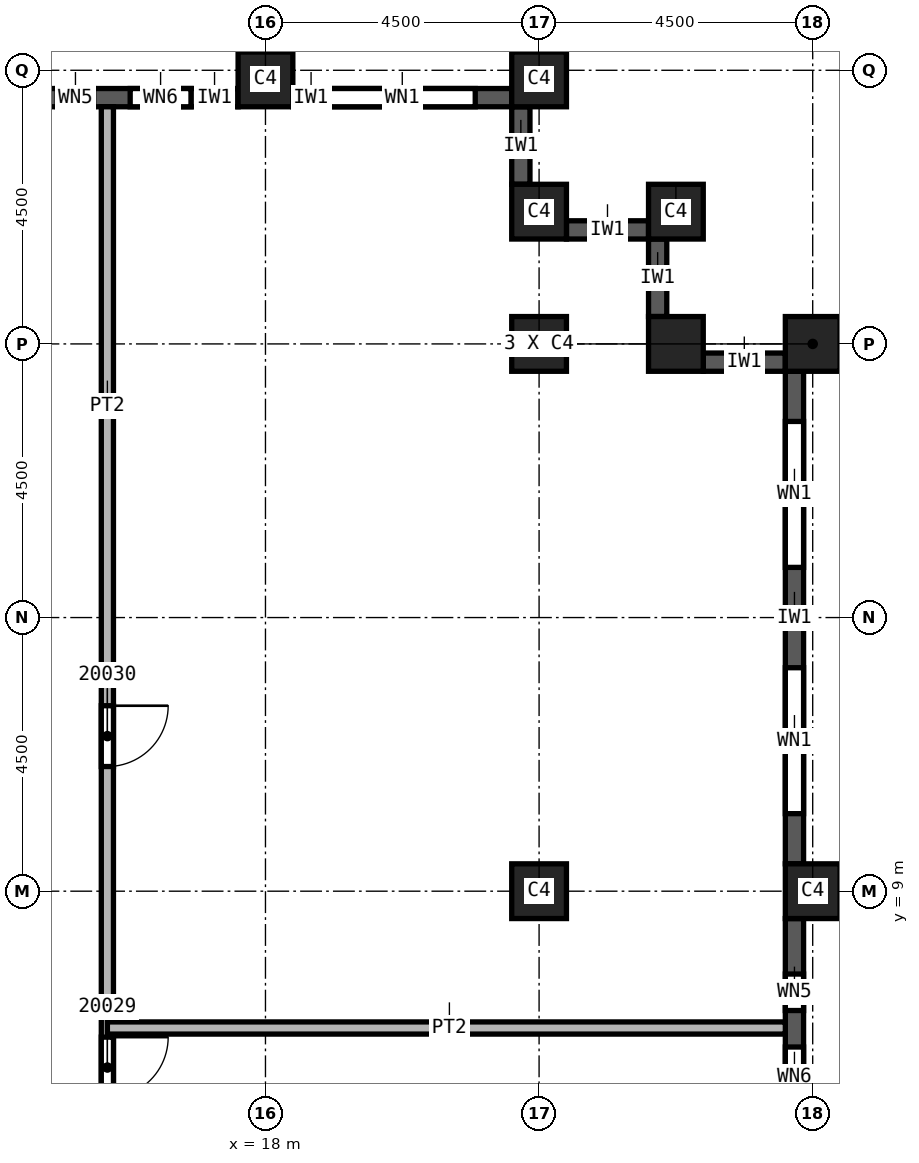
"""IFC4 building model, lengths in metres.
Left out: names, types, materials, properties, quantities, classifications, styles, units other than length and angle.
Written with IfcOpenShell. Run it as: python <this file> out.ifc"""

import sys

from ifc_helpers import new_model, si_unit, direction, frame, frame_2d, origin, origin_2d, place, context, subcontext, project, spatial, rectangle, extrude, element, fill, save


model = new_model("IFC4")
c1 = context("Model", 3, precision=1e-05, world=origin(), true_north=direction((0.0, 1.0)))
c2 = subcontext(c1, "Body", "Model", "MODEL_VIEW")
j1 = project(units=[si_unit("LENGTHUNIT", "METRE"), si_unit("PLANEANGLEUNIT", "RADIAN")], contexts=[c1])
p1 = place(None, origin())
s1 = spatial("IfcSite", under=j1, at=p1, CompositionType="ELEMENT")
p2 = place(p1, origin())
s2 = spatial("IfcBuilding", under=s1, at=p2, CompositionType="ELEMENT")
p3 = place(p2, frame((0.0, 0.0, 290.0)))
s3 = spatial("IfcBuildingStorey", under=s2, at=p3, CompositionType="ELEMENT", Elevation=290.0)
for number, where, z_axis, x_axis in (
    (1, (22.5, 9.0, 0.0), (0.0, 0.0, 1.0), (1.0, 0.0, 0.0)),
    (2, (22.5, 18.0, 0.0), (0.0, 0.0, 1.0), (1.0, 0.0, 0.0)),
    (3, (27.0, 9.0, 0.0), (0.0, 0.0, 1.0), (0.0, 1.0, 0.0)),
    (4, (27.0, 18.0, 0.0), (0.0, 0.0, 1.0), (0.0, 1.0, 0.0)),
    (5, (18.0, 22.35, 0.0), (0.0, 0.0, 1.0), (1.0, 0.0, 0.0)),
    (6, (22.5, 22.35, 0.0), (0.0, 0.0, 1.0), (1.0, 0.0, 0.0)),
    (7, (22.5, 20.175, 0.0), (0.0, 0.0, 1.0), (1.0, 0.0, 0.0)),
    (8, (24.75, 20.175, 0.0), (0.0, 0.0, 1.0), (1.0, 0.0, 0.0)),
    (9, (24.75, 18.0, 0.0), (0.0, 0.0, 1.0), (1.0, 0.0, 0.0)),
):
    element("IfcColumn", number, at=place(p3, frame(where, z_axis=z_axis, x_axis=x_axis)), inside=s3, PredefinedType="COLUMN", context=c2, shape_type="SweptSolid", body=[
        extrude(rectangle(XDim=0.9, YDim=0.9, at=origin_2d()), origin(), (0.0, 0.0, 1.0), 3.59),
    ])
p4 = place(p3, frame((26.7, 0.45, 0.0), z_axis=(0.0, 0.0, 1.0), x_axis=(0.0, 1.0, 0.0)))
e10 = element("IfcWall", 10, at=p4, inside=s3, PredefinedType="SOLIDWALL", context=c2, shape_type="SweptSolid", body=[
    extrude(rectangle(XDim=8.1, YDim=0.3, at=frame_2d((4.05, 0.0))), origin(), (0.0, 0.0, 1.0), 2.99),
])
p5 = place(p4, frame((0.875, 0.0, 0.8)))
e11 = element("IfcOpeningElement", 11, at=p5, cuts=e10, PredefinedType="OPENING", context=c2, shape_type="SweptSolid", body=[
    extrude(rectangle(XDim=1.8, YDim=1.95, at=frame_2d((0.9, 0.975))), frame((0.0, 0.15, 0.0), z_axis=(0.0, -1.0, 0.0), x_axis=(1.0, 0.0, 0.0)), (0.0, 0.0, 1.0), 0.3),
])
p6 = place(p4, frame((4.988, 0.0, 0.8)))
e12 = element("IfcOpeningElement", 12, at=p6, cuts=e10, PredefinedType="OPENING", context=c2, shape_type="SweptSolid", body=[
    extrude(rectangle(XDim=1.0, YDim=1.95, at=frame_2d((0.5, 0.975))), frame((0.0, 0.15, 0.0), z_axis=(0.0, -1.0, 0.0), x_axis=(1.0, 0.0, 0.0)), (0.0, 0.0, 1.0), 0.3),
])
p7 = place(p4, frame((6.587, 0.0, 0.8)))
e13 = element("IfcOpeningElement", 13, at=p7, cuts=e10, PredefinedType="OPENING", context=c2, shape_type="SweptSolid", body=[
    extrude(rectangle(XDim=0.6, YDim=1.95, at=frame_2d((0.3, 0.975))), frame((0.0, 0.15, 0.0), z_axis=(0.0, -1.0, 0.0), x_axis=(1.0, 0.0, 0.0)), (0.0, 0.0, 1.0), 0.3),
])
p8 = place(p3, frame((26.7, 9.45, 0.0), z_axis=(0.0, 0.0, 1.0), x_axis=(0.0, 1.0, 0.0)))
e14 = element("IfcWall", 14, at=p8, inside=s3, PredefinedType="SOLIDWALL", context=c2, shape_type="SweptSolid", body=[
    extrude(rectangle(XDim=8.1, YDim=0.3, at=frame_2d((4.05, 0.0))), origin(), (0.0, 0.0, 1.0), 2.99),
])
p9 = place(p8, frame((0.825, 0.0, 0.8)))
e15 = element("IfcOpeningElement", 15, at=p9, cuts=e14, PredefinedType="OPENING", context=c2, shape_type="SweptSolid", body=[
    extrude(rectangle(XDim=2.4, YDim=1.95, at=frame_2d((1.2, 0.975))), frame((0.0, 0.15, 0.0), z_axis=(0.0, -1.0, 0.0), x_axis=(1.0, 0.0, 0.0)), (0.0, 0.0, 1.0), 0.3),
])
p10 = place(p8, frame((4.875, 0.0, 0.8)))
e16 = element("IfcOpeningElement", 16, at=p10, cuts=e14, PredefinedType="OPENING", context=c2, shape_type="SweptSolid", body=[
    extrude(rectangle(XDim=2.4, YDim=1.95, at=frame_2d((1.2, 0.975))), frame((0.0, 0.15, 0.0), z_axis=(0.0, -1.0, 0.0), x_axis=(1.0, 0.0, 0.0)), (0.0, 0.0, 1.0), 0.3),
])
p11 = place(p3, frame((26.55, 17.7, 0.0), z_axis=(0.0, 0.0, 1.0), x_axis=(-1.0, 0.0, 0.0)))
e17 = element("IfcWall", 17, at=p11, inside=s3, PredefinedType="SOLIDWALL", context=c2, shape_type="SweptSolid", body=[
    extrude(rectangle(XDim=1.35, YDim=0.3, at=frame_2d((0.675, 0.0))), origin(), (0.0, 0.0, 1.0), 2.99),
])
p12 = place(p3, frame((24.45, 18.45, 0.0), z_axis=(0.0, 0.0, 1.0), x_axis=(0.0, 1.0, 0.0)))
e18 = element("IfcWall", 18, at=p12, inside=s3, PredefinedType="SOLIDWALL", context=c2, shape_type="SweptSolid", body=[
    extrude(rectangle(XDim=1.275, YDim=0.3, at=frame_2d((0.638, 0.0))), origin(), (0.0, 0.0, 1.0), 2.99),
])
p13 = place(p3, frame((24.3, 19.875, 0.0), z_axis=(0.0, 0.0, 1.0), x_axis=(-1.0, 0.0, 0.0)))
e19 = element("IfcWall", 19, at=p13, inside=s3, PredefinedType="SOLIDWALL", context=c2, shape_type="SweptSolid", body=[
    extrude(rectangle(XDim=1.35, YDim=0.3, at=frame_2d((0.675, 0.0))), origin(), (0.0, 0.0, 1.0), 2.99),
])
p14 = place(p3, frame((22.2, 20.625, 0.0), z_axis=(0.0, 0.0, 1.0), x_axis=(0.0, 1.0, 0.0)))
e20 = element("IfcWall", 20, at=p14, inside=s3, PredefinedType="SOLIDWALL", context=c2, shape_type="SweptSolid", body=[
    extrude(rectangle(XDim=1.275, YDim=0.3, at=frame_2d((0.637, 0.0))), origin(), (0.0, 0.0, 1.0), 2.99),
])
p15 = place(p3, frame((22.05, 22.05, 0.0), z_axis=(0.0, 0.0, 1.0), x_axis=(-1.0, 0.0, 0.0)))
e21 = element("IfcWall", 21, at=p15, inside=s3, PredefinedType="SOLIDWALL", context=c2, shape_type="SweptSolid", body=[
    extrude(rectangle(XDim=3.6, YDim=0.3, at=frame_2d((1.8, 0.0))), origin(), (0.0, 0.0, 1.0), 2.99),
])
p16 = place(p15, frame((0.6, 0.0, 0.8)))
e22 = element("IfcOpeningElement", 22, at=p16, cuts=e21, PredefinedType="OPENING", context=c2, shape_type="SweptSolid", body=[
    extrude(rectangle(XDim=2.4, YDim=1.95, at=frame_2d((1.2, 0.975))), frame((0.0, 0.15, 0.0), z_axis=(0.0, -1.0, 0.0), x_axis=(1.0, 0.0, 0.0)), (0.0, 0.0, 1.0), 0.3),
])
p17 = place(p3, frame((17.55, 22.05, 0.0), z_axis=(0.0, 0.0, 1.0), x_axis=(-1.0, 0.0, 0.0)))
e23 = element("IfcWall", 23, at=p17, inside=s3, PredefinedType="SOLIDWALL", context=c2, shape_type="SweptSolid", body=[
    extrude(rectangle(XDim=3.6, YDim=0.3, at=frame_2d((1.8, 0.0))), origin(), (0.0, 0.0, 1.0), 2.99),
])
p18 = place(p17, frame((0.775, 0.0, 0.8)))
e24 = element("IfcOpeningElement", 24, at=p18, cuts=e23, PredefinedType="OPENING", context=c2, shape_type="SweptSolid", body=[
    extrude(rectangle(XDim=1.0, YDim=1.95, at=frame_2d((0.5, 0.975))), frame((0.0, 0.15, 0.0), z_axis=(0.0, -1.0, 0.0), x_axis=(1.0, 0.0, 0.0)), (0.0, 0.0, 1.0), 0.3),
])
p19 = place(p17, frame((2.375, 0.0, 0.8)))
e25 = element("IfcOpeningElement", 25, at=p19, cuts=e23, PredefinedType="OPENING", context=c2, shape_type="SweptSolid", body=[
    extrude(rectangle(XDim=0.6, YDim=1.95, at=frame_2d((0.3, 0.975))), frame((0.0, 0.15, 0.0), z_axis=(0.0, -1.0, 0.0), x_axis=(1.0, 0.0, 0.0)), (0.0, 0.0, 1.0), 0.3),
])
p20 = place(p3, frame((15.4, 21.9, 0.0), z_axis=(0.0, 0.0, 1.0), x_axis=(0.0, -1.0, 0.0)))
e26 = element("IfcWall", 26, at=p20, inside=s3, PredefinedType="PARTITIONING", context=c2, shape_type="SweptSolid", body=[
    extrude(rectangle(XDim=43.8, YDim=0.2, at=frame_2d((21.9, 0.0))), origin(), (0.0, 0.0, 1.0), 3.59),
])
p21 = place(p20, frame((18.675, 0.0, 0.0)))
e27 = element("IfcOpeningElement", 27, at=p21, cuts=e26, PredefinedType="OPENING", context=c2, shape_type="SweptSolid", body=[
    extrude(rectangle(XDim=1.0, YDim=2.1, at=frame_2d((0.5, 1.05))), frame((0.0, 0.1, 0.0), z_axis=(0.0, -1.0, 0.0), x_axis=(1.0, 0.0, 0.0)), (0.0, 0.0, 1.0), 0.2),
])
p22 = place(p20, frame((15.3, 0.0, 0.0)))
e28 = element("IfcOpeningElement", 28, at=p22, cuts=e26, PredefinedType="OPENING", context=c2, shape_type="SweptSolid", body=[
    extrude(rectangle(XDim=1.0, YDim=2.1, at=frame_2d((0.5, 1.05))), frame((0.0, 0.1, 0.0), z_axis=(0.0, -1.0, 0.0), x_axis=(1.0, 0.0, 0.0)), (0.0, 0.0, 1.0), 0.2),
])
p23 = place(p20, frame((9.85, 0.0, 0.0)))
e29 = element("IfcOpeningElement", 29, at=p23, cuts=e26, PredefinedType="OPENING", context=c2, shape_type="SweptSolid", body=[
    extrude(rectangle(XDim=1.0, YDim=2.1, at=frame_2d((0.5, 1.05))), frame((0.0, 0.1, 0.0), z_axis=(0.0, -1.0, 0.0), x_axis=(1.0, 0.0, 0.0)), (0.0, 0.0, 1.0), 0.2),
])
p24 = place(p20, frame((42.0, 0.0, 0.0)))
e30 = element("IfcOpeningElement", 30, at=p24, cuts=e26, PredefinedType="OPENING", context=c2, shape_type="SweptSolid", body=[
    extrude(rectangle(XDim=1.0, YDim=2.1, at=frame_2d((0.5, 1.05))), frame((0.0, 0.1, 0.0), z_axis=(0.0, -1.0, 0.0), x_axis=(1.0, 0.0, 0.0)), (0.0, 0.0, 1.0), 0.2),
])
p25 = place(p20, frame((34.65, 0.0, 0.0)))
e31 = element("IfcOpeningElement", 31, at=p25, cuts=e26, PredefinedType="OPENING", context=c2, shape_type="SweptSolid", body=[
    extrude(rectangle(XDim=1.0, YDim=2.1, at=frame_2d((0.5, 1.05))), frame((0.0, 0.1, 0.0), z_axis=(0.0, -1.0, 0.0), x_axis=(1.0, 0.0, 0.0)), (0.0, 0.0, 1.0), 0.2),
])
p26 = place(p20, frame((25.95, 0.0, 0.0)))
e32 = element("IfcOpeningElement", 32, at=p26, cuts=e26, PredefinedType="OPENING", context=c2, shape_type="SweptSolid", body=[
    extrude(rectangle(XDim=1.0, YDim=2.1, at=frame_2d((0.5, 1.05))), frame((0.0, 0.1, 0.0), z_axis=(0.0, -1.0, 0.0), x_axis=(1.0, 0.0, 0.0)), (0.0, 0.0, 1.0), 0.2),
])
p27 = place(p3, frame((15.4, 6.75, 0.0), z_axis=(0.0, 0.0, 1.0), x_axis=(1.0, 0.0, 0.0)))
e33 = element("IfcWall", 33, at=p27, inside=s3, PredefinedType="PARTITIONING", context=c2, shape_type="SweptSolid", body=[
    extrude(rectangle(XDim=11.15, YDim=0.2, at=frame_2d((5.575, 0.0))), origin(), (0.0, 0.0, 1.0), 3.59),
])
p28 = place(p9, origin())
e34 = element("IfcWindow", 34, at=p28, inside=s3, PartitioningType="SINGLE_PANEL", PredefinedType="WINDOW", context=c2, shape_type="SweptSolid", body=[
    extrude(rectangle(XDim=2.4, YDim=1.95, at=frame_2d((1.2, 0.975))), frame((0.0, 0.03, 0.0), z_axis=(0.0, -1.0, 0.0), x_axis=(1.0, 0.0, 0.0)), (0.0, 0.0, 1.0), 0.06),
])
fill(e15, e34)
p29 = place(p10, origin())
e35 = element("IfcWindow", 35, at=p29, inside=s3, PartitioningType="SINGLE_PANEL", PredefinedType="WINDOW", context=c2, shape_type="SweptSolid", body=[
    extrude(rectangle(XDim=2.4, YDim=1.95, at=frame_2d((1.2, 0.975))), frame((0.0, 0.03, 0.0), z_axis=(0.0, -1.0, 0.0), x_axis=(1.0, 0.0, 0.0)), (0.0, 0.0, 1.0), 0.06),
])
fill(e16, e35)
p30 = place(p16, origin())
e36 = element("IfcWindow", 36, at=p30, inside=s3, PartitioningType="SINGLE_PANEL", PredefinedType="WINDOW", context=c2, shape_type="SweptSolid", body=[
    extrude(rectangle(XDim=2.4, YDim=1.95, at=frame_2d((1.2, 0.975))), frame((0.0, 0.03, 0.0), z_axis=(0.0, -1.0, 0.0), x_axis=(1.0, 0.0, 0.0)), (0.0, 0.0, 1.0), 0.06),
])
fill(e22, e36)
p31 = place(p22, origin())
e37 = element("IfcDoor", 37, at=p31, inside=s3, OperationType="SINGLE_SWING_RIGHT", PredefinedType="DOOR", context=c2, shape_type="SweptSolid", body=[
    extrude(rectangle(XDim=1.0, YDim=2.1, at=frame_2d((0.5, 1.05))), frame((0.0, 0.025, 0.0), z_axis=(0.0, -1.0, 0.0), x_axis=(1.0, 0.0, 0.0)), (0.0, 0.0, 1.0), 0.05),
])
fill(e28, e37)
p32 = place(p23, origin())
e38 = element("IfcDoor", 38, at=p32, inside=s3, OperationType="SINGLE_SWING_LEFT", PredefinedType="DOOR", context=c2, shape_type="SweptSolid", body=[
    extrude(rectangle(XDim=1.0, YDim=2.1, at=frame_2d((0.5, 1.05))), frame((0.0, 0.025, 0.0), z_axis=(0.0, -1.0, 0.0), x_axis=(1.0, 0.0, 0.0)), (0.0, 0.0, 1.0), 0.05),
])
fill(e29, e38)
p33 = place(p6, origin())
e39 = element("IfcWindow", 39, at=p33, inside=s3, PartitioningType="SINGLE_PANEL", PredefinedType="WINDOW", context=c2, shape_type="SweptSolid", body=[
    extrude(rectangle(XDim=1.0, YDim=1.95, at=frame_2d((0.5, 0.975))), frame((0.0, 0.03, 0.0), z_axis=(0.0, -1.0, 0.0), x_axis=(1.0, 0.0, 0.0)), (0.0, 0.0, 1.0), 0.06),
])
fill(e12, e39)
p34 = place(p7, origin())
e40 = element("IfcWindow", 40, at=p34, inside=s3, PartitioningType="SINGLE_PANEL", PredefinedType="WINDOW", context=c2, shape_type="SweptSolid", body=[
    extrude(rectangle(XDim=0.6, YDim=1.95, at=frame_2d((0.3, 0.975))), frame((0.0, 0.03, 0.0), z_axis=(0.0, -1.0, 0.0), x_axis=(1.0, 0.0, 0.0)), (0.0, 0.0, 1.0), 0.06),
])
fill(e13, e40)
p35 = place(p18, origin())
e41 = element("IfcWindow", 41, at=p35, inside=s3, PartitioningType="SINGLE_PANEL", PredefinedType="WINDOW", context=c2, shape_type="SweptSolid", body=[
    extrude(rectangle(XDim=1.0, YDim=1.95, at=frame_2d((0.5, 0.975))), frame((0.0, 0.03, 0.0), z_axis=(0.0, -1.0, 0.0), x_axis=(1.0, 0.0, 0.0)), (0.0, 0.0, 1.0), 0.06),
])
fill(e24, e41)
p36 = place(p19, origin())
e42 = element("IfcWindow", 42, at=p36, inside=s3, PartitioningType="SINGLE_PANEL", PredefinedType="WINDOW", context=c2, shape_type="SweptSolid", body=[
    extrude(rectangle(XDim=0.6, YDim=1.95, at=frame_2d((0.3, 0.975))), frame((0.0, 0.03, 0.0), z_axis=(0.0, -1.0, 0.0), x_axis=(1.0, 0.0, 0.0)), (0.0, 0.0, 1.0), 0.06),
])
fill(e25, e42)
save(model, sys.argv[1])
